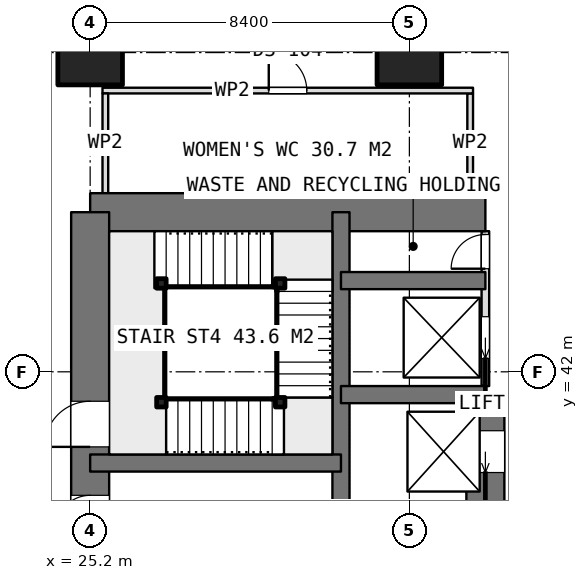
"""IFC4 building model, lengths in metres.
Left out: names, types, materials, properties, quantities, classifications, styles, units other than length and angle.
Written with IfcOpenShell. Run it as: python <this file> out.ifc"""

import sys

from ifc_helpers import new_model, si_unit, direction, frame, frame_2d, origin, origin_2d, place, context, subcontext, project, spatial, rectangle, extrude, element, fill, save


model = new_model("IFC4")
c1 = context("Model", 3, precision=1e-05, world=origin(), true_north=direction((0.0, 1.0)))
c2 = subcontext(c1, "Body", "Model", "MODEL_VIEW")
j1 = project(units=[si_unit("LENGTHUNIT", "METRE"), si_unit("PLANEANGLEUNIT", "RADIAN")], contexts=[c1])
p1 = place(None, origin())
s1 = spatial("IfcSite", under=j1, at=p1, CompositionType="ELEMENT")
p2 = place(p1, origin())
s2 = spatial("IfcBuilding", under=s1, at=p2, CompositionType="ELEMENT")
p3 = place(p2, frame((0.0, 0.0, 99.05)))
s3 = spatial("IfcBuildingStorey", under=s2, at=p3, CompositionType="ELEMENT", Elevation=99.05)
p4 = place(p3, frame((25.2, 46.2, 0.0), z_axis=(0.0, 0.0, 1.0), x_axis=(1.0, 0.0, 0.0)))
e1 = element("IfcWall", 1, at=p4, inside=s3, PredefinedType="SHEAR", context=c2, shape_type="SweptSolid", body=[
    extrude(rectangle(XDim=10.4, YDim=1.0, at=frame_2d((5.2, 0.0))), origin(), (0.0, 0.0, 1.0), 3.75),
])
p5 = place(p3, frame((25.2, 21.0, 0.0), z_axis=(0.0, 0.0, 1.0), x_axis=(0.0, 1.0, 0.0)))
e2 = element("IfcWall", 2, at=p5, inside=s3, PredefinedType="SHEAR", context=c2, shape_type="SweptSolid", body=[
    extrude(rectangle(XDim=25.2, YDim=1.0, at=frame_2d((12.6, 0.0))), origin(), (0.0, 0.0, 1.0), 3.75),
])
p6 = place(p5, frame((7.8, 0.0, 0.0)))
e3 = element("IfcOpeningElement", 3, at=p6, cuts=e2, PredefinedType="OPENING", context=c2, shape_type="SweptSolid", body=[
    extrude(rectangle(XDim=1.2, YDim=2.1, at=frame_2d((0.6, 1.05))), frame((0.0, 0.51, 0.0), z_axis=(0.0, -1.0, 0.0), x_axis=(1.0, 0.0, 0.0)), (0.0, 0.0, 1.0), 1.02),
])
p7 = place(p5, frame((14.25, 0.0, 0.0)))
e4 = element("IfcOpeningElement", 4, at=p7, cuts=e2, PredefinedType="OPENING", context=c2, shape_type="SweptSolid", body=[
    extrude(rectangle(XDim=0.9, YDim=2.1, at=frame_2d((0.45, 1.05))), frame((0.0, 0.51, 0.0), z_axis=(0.0, -1.0, 0.0), x_axis=(1.0, 0.0, 0.0)), (0.0, 0.0, 1.0), 1.02),
])
p8 = place(p5, frame((16.85, 0.0, 0.0)))
e5 = element("IfcOpeningElement", 5, at=p8, cuts=e2, PredefinedType="OPENING", context=c2, shape_type="SweptSolid", body=[
    extrude(rectangle(XDim=0.9, YDim=2.1, at=frame_2d((0.45, 1.05))), frame((0.0, 0.51, 0.0), z_axis=(0.0, -1.0, 0.0), x_axis=(1.0, 0.0, 0.0)), (0.0, 0.0, 1.0), 1.02),
])
p9 = place(p5, frame((19.025, 0.0, 0.0)))
e6 = element("IfcOpeningElement", 6, at=p9, cuts=e2, PredefinedType="OPENING", context=c2, shape_type="SweptSolid", body=[
    extrude(rectangle(XDim=1.2, YDim=2.1, at=frame_2d((0.6, 1.05))), frame((0.0, 0.51, 0.0), z_axis=(0.0, -1.0, 0.0), x_axis=(1.0, 0.0, 0.0)), (0.0, 0.0, 1.0), 1.02),
])
p10 = place(p3, frame((31.8, 21.0, 0.0), z_axis=(0.0, 0.0, 1.0), x_axis=(0.0, 1.0, 0.0)))
e7 = element("IfcWall", 7, at=p10, inside=s3, PredefinedType="SHEAR", context=c2, shape_type="SweptSolid", body=[
    extrude(rectangle(XDim=25.2, YDim=0.45, at=frame_2d((12.6, 0.0))), origin(), (0.0, 0.0, 1.0), 3.75),
])
p11 = place(p3, frame((35.6, 23.4, 0.0), z_axis=(0.0, 0.0, 1.0), x_axis=(0.0, 1.0, 0.0)))
e8 = element("IfcWall", 8, at=p11, inside=s3, PredefinedType="SHEAR", context=c2, shape_type="SweptSolid", body=[
    extrude(rectangle(XDim=18.0, YDim=1.0, at=frame_2d((9.0, 0.0))), origin(), (0.0, 0.0, 1.0), 3.75),
])
p12 = place(p11, frame((0.95, 0.0, 0.0)))
e9 = element("IfcOpeningElement", 9, at=p12, cuts=e8, PredefinedType="OPENING", context=c2, shape_type="SweptSolid", body=[
    extrude(rectangle(XDim=1.1, YDim=2.1, at=frame_2d((0.55, 1.05))), frame((0.0, 0.51, 0.0), z_axis=(0.0, -1.0, 0.0), x_axis=(1.0, 0.0, 0.0)), (0.0, 0.0, 1.0), 1.02),
])
p13 = place(p11, frame((3.95, 0.0, 0.0)))
e10 = element("IfcOpeningElement", 10, at=p13, cuts=e8, PredefinedType="OPENING", context=c2, shape_type="SweptSolid", body=[
    extrude(rectangle(XDim=1.1, YDim=2.1, at=frame_2d((0.55, 1.05))), frame((0.0, 0.51, 0.0), z_axis=(0.0, -1.0, 0.0), x_axis=(1.0, 0.0, 0.0)), (0.0, 0.0, 1.0), 1.02),
])
p14 = place(p11, frame((6.95, 0.0, 0.0)))
e11 = element("IfcOpeningElement", 11, at=p14, cuts=e8, PredefinedType="OPENING", context=c2, shape_type="SweptSolid", body=[
    extrude(rectangle(XDim=1.1, YDim=2.1, at=frame_2d((0.55, 1.05))), frame((0.0, 0.51, 0.0), z_axis=(0.0, -1.0, 0.0), x_axis=(1.0, 0.0, 0.0)), (0.0, 0.0, 1.0), 1.02),
])
p15 = place(p11, frame((9.95, 0.0, 0.0)))
e12 = element("IfcOpeningElement", 12, at=p15, cuts=e8, PredefinedType="OPENING", context=c2, shape_type="SweptSolid", body=[
    extrude(rectangle(XDim=1.1, YDim=2.1, at=frame_2d((0.55, 1.05))), frame((0.0, 0.51, 0.0), z_axis=(0.0, -1.0, 0.0), x_axis=(1.0, 0.0, 0.0)), (0.0, 0.0, 1.0), 1.02),
])
p16 = place(p11, frame((12.95, 0.0, 0.0)))
e13 = element("IfcOpeningElement", 13, at=p16, cuts=e8, PredefinedType="OPENING", context=c2, shape_type="SweptSolid", body=[
    extrude(rectangle(XDim=1.1, YDim=2.1, at=frame_2d((0.55, 1.05))), frame((0.0, 0.51, 0.0), z_axis=(0.0, -1.0, 0.0), x_axis=(1.0, 0.0, 0.0)), (0.0, 0.0, 1.0), 1.02),
])
p17 = place(p11, frame((15.95, 0.0, 0.0)))
e14 = element("IfcOpeningElement", 14, at=p17, cuts=e8, PredefinedType="OPENING", context=c2, shape_type="SweptSolid", body=[
    extrude(rectangle(XDim=1.1, YDim=2.1, at=frame_2d((0.55, 1.05))), frame((0.0, 0.51, 0.0), z_axis=(0.0, -1.0, 0.0), x_axis=(1.0, 0.0, 0.0)), (0.0, 0.0, 1.0), 1.02),
])
for number, where, z_axis, x_axis in (
    (15, (31.8, 41.4, 0.0), (0.0, 0.0, 1.0), (1.0, 0.0, 0.0)),
    (16, (31.8, 44.4, 0.0), (0.0, 0.0, 1.0), (1.0, 0.0, 0.0)),
):
    element("IfcWall", number, at=place(p3, frame(where, z_axis=z_axis, x_axis=x_axis)), inside=s3, PredefinedType="SHEAR", context=c2, shape_type="SweptSolid", body=[
        extrude(rectangle(XDim=3.8, YDim=0.45, at=frame_2d((1.9, 0.0))), origin(), (0.0, 0.0, 1.0), 3.75),
    ])
p18 = place(p3, frame((25.2, 39.6, 0.0), z_axis=(0.0, 0.0, 1.0), x_axis=(1.0, 0.0, 0.0)))
e17 = element("IfcWall", 17, at=p18, inside=s3, PredefinedType="SHEAR", context=c2, shape_type="SweptSolid", body=[
    extrude(rectangle(XDim=6.6, YDim=0.45, at=frame_2d((3.3, 0.0))), origin(), (0.0, 0.0, 1.0), 3.75),
])
for number, where, z_axis, x_axis in (
    (18, (25.2, 50.4, 0.0), (0.0, 0.0, 1.0), (1.0, 0.0, 0.0)),
    (19, (33.6, 50.4, 0.0), (0.0, 0.0, 1.0), (1.0, 0.0, 0.0)),
):
    element("IfcColumn", number, at=place(p3, frame(where, z_axis=z_axis, x_axis=x_axis)), inside=s3, PredefinedType="COLUMN", context=c2, shape_type="SweptSolid", body=[
        extrude(rectangle(XDim=1.7, YDim=1.7, at=origin_2d()), origin(), (0.0, 0.0, 1.0), 3.75),
    ])
p19 = place(p3, frame((35.6, 41.625, 0.0), z_axis=(0.0, 0.0, 1.0), x_axis=(0.0, 1.0, 0.0)))
e20 = element("IfcWall", 20, at=p19, inside=s3, PredefinedType="PARTITIONING", context=c2, shape_type="SweptSolid", body=[
    extrude(rectangle(XDim=4.075, YDim=0.2, at=frame_2d((2.038, 0.0))), origin(), (0.0, 0.0, 1.0), 3.5),
])
p20 = place(p19, frame((3.088, 0.0, 0.0)))
e21 = element("IfcOpeningElement", 21, at=p20, cuts=e20, PredefinedType="OPENING", context=c2, shape_type="SweptSolid", body=[
    extrude(rectangle(XDim=0.9, YDim=2.1, at=frame_2d((0.45, 1.05))), frame((0.0, 0.11, 0.0), z_axis=(0.0, -1.0, 0.0), x_axis=(1.0, 0.0, 0.0)), (0.0, 0.0, 1.0), 0.22),
])
p21 = place(p19, frame((0.725, 0.0, 0.0)))
e22 = element("IfcOpeningElement", 22, at=p21, cuts=e20, PredefinedType="OPENING", context=c2, shape_type="SweptSolid", body=[
    extrude(rectangle(XDim=1.1, YDim=2.1, at=frame_2d((0.55, 1.05))), frame((0.0, 0.11, 0.0), z_axis=(0.0, -1.0, 0.0), x_axis=(1.0, 0.0, 0.0)), (0.0, 0.0, 1.0), 0.22),
])
p22 = place(p3, frame((25.525, 49.4, 0.0), z_axis=(0.0, 0.0, 1.0), x_axis=(1.0, 0.0, 0.0)))
e23 = element("IfcWall", 23, at=p22, inside=s3, PredefinedType="PARTITIONING", context=c2, shape_type="SweptSolid", body=[
    extrude(rectangle(XDim=9.75, YDim=0.15, at=frame_2d((4.875, 0.0))), origin(), (0.0, 0.0, 1.0), 3.5),
])
p23 = place(p22, frame((4.375, 0.0, 0.0)))
e24 = element("IfcOpeningElement", 24, at=p23, cuts=e23, PredefinedType="OPENING", context=c2, shape_type="SweptSolid", body=[
    extrude(rectangle(XDim=1.0, YDim=2.1, at=frame_2d((0.5, 1.05))), frame((0.0, 0.085, 0.0), z_axis=(0.0, -1.0, 0.0), x_axis=(1.0, 0.0, 0.0)), (0.0, 0.0, 1.0), 0.17),
])
for number, where, z_axis, x_axis in (
    (25, (25.6, 46.7, 0.0), (0.0, 0.0, 1.0), (0.0, 1.0, 0.0)),
    (26, (35.2, 46.7, 0.0), (0.0, 0.0, 1.0), (0.0, 1.0, 0.0)),
):
    element("IfcWall", number, at=place(p3, frame(where, z_axis=z_axis, x_axis=x_axis)), inside=s3, PredefinedType="PARTITIONING", context=c2, shape_type="SweptSolid", body=[
        extrude(rectangle(XDim=2.625, YDim=0.15, at=frame_2d((1.312, 0.0))), origin(), (0.0, 0.0, 1.0), 3.5),
    ])
for number, where, z_axis, x_axis in (
    (27, (27.075, 41.2, 0.0), (0.0, 0.0, 1.0), (1.0, 0.0, 0.0)),
    (28, (30.2, 41.2, 0.0), (0.0, 0.0, 1.0), (1.0, 0.0, 0.0)),
    (29, (30.2, 44.325, 0.0), (0.0, 0.0, 1.0), (1.0, 0.0, 0.0)),
    (30, (27.075, 44.325, 0.0), (0.0, 0.0, 1.0), (1.0, 0.0, 0.0)),
):
    element("IfcColumn", number, at=place(p3, frame(where, z_axis=z_axis, x_axis=x_axis)), inside=s3, PredefinedType="COLUMN", context=c2, shape_type="SweptSolid", body=[
        extrude(rectangle(XDim=0.25, YDim=0.25, at=origin_2d()), origin(), (0.0, 0.0, 1.0), 3.75),
    ])
p24 = place(p8, origin())
e31 = element("IfcDoor", 31, at=p24, inside=s3, OperationType="SINGLE_SWING_LEFT", PredefinedType="DOOR", context=c2, shape_type="SweptSolid", body=[
    extrude(rectangle(XDim=0.9, YDim=2.1, at=frame_2d((0.45, 1.05))), frame((0.0, 0.025, 0.0), z_axis=(0.0, -1.0, 0.0), x_axis=(1.0, 0.0, 0.0)), (0.0, 0.0, 1.0), 0.05),
])
fill(e5, e31)
p25 = place(p20, origin())
e32 = element("IfcDoor", 32, at=p25, inside=s3, OperationType="SINGLE_SWING_LEFT", PredefinedType="DOOR", context=c2, shape_type="SweptSolid", body=[
    extrude(rectangle(XDim=0.9, YDim=2.1, at=frame_2d((0.45, 1.05))), frame((0.0, 0.025, 0.0), z_axis=(0.0, -1.0, 0.0), x_axis=(1.0, 0.0, 0.0)), (0.0, 0.0, 1.0), 0.05),
])
fill(e21, e32)
p26 = place(p17, origin())
e33 = element("IfcDoor", 33, at=p26, inside=s3, OperationType="SLIDING_TO_LEFT", PredefinedType="USERDEFINED", context=c2, shape_type="SweptSolid", body=[
    extrude(rectangle(XDim=1.1, YDim=2.1, at=frame_2d((0.55, 1.05))), frame((0.0, 0.025, 0.0), z_axis=(0.0, -1.0, 0.0), x_axis=(1.0, 0.0, 0.0)), (0.0, 0.0, 1.0), 0.05),
])
fill(e14, e33)
p27 = place(p21, origin())
e34 = element("IfcDoor", 34, at=p27, inside=s3, OperationType="SLIDING_TO_LEFT", PredefinedType="USERDEFINED", context=c2, shape_type="SweptSolid", body=[
    extrude(rectangle(XDim=1.1, YDim=2.1, at=frame_2d((0.55, 1.05))), frame((0.0, 0.025, 0.0), z_axis=(0.0, -1.0, 0.0), x_axis=(1.0, 0.0, 0.0)), (0.0, 0.0, 1.0), 0.05),
])
fill(e22, e34)
p28 = place(p23, origin())
e35 = element("IfcDoor", 35, at=p28, inside=s3, OperationType="SINGLE_SWING_LEFT", PredefinedType="DOOR", context=c2, shape_type="SweptSolid", body=[
    extrude(rectangle(XDim=1.0, YDim=2.1, at=frame_2d((0.5, 1.05))), frame((0.0, 0.025, 0.0), z_axis=(0.0, -1.0, 0.0), x_axis=(1.0, 0.0, 0.0)), (0.0, 0.0, 1.0), 0.05),
])
fill(e24, e35)
p29 = place(p9, origin())
e36 = element("IfcDoor", 36, at=p29, inside=s3, OperationType="SINGLE_SWING_RIGHT", PredefinedType="DOOR", context=c2, shape_type="SweptSolid", body=[
    extrude(rectangle(XDim=1.2, YDim=2.1, at=frame_2d((0.6, 1.05))), frame((0.0, 0.025, 0.0), z_axis=(0.0, -1.0, 0.0), x_axis=(1.0, 0.0, 0.0)), (0.0, 0.0, 1.0), 0.05),
])
fill(e6, e36)
save(model, sys.argv[1])
